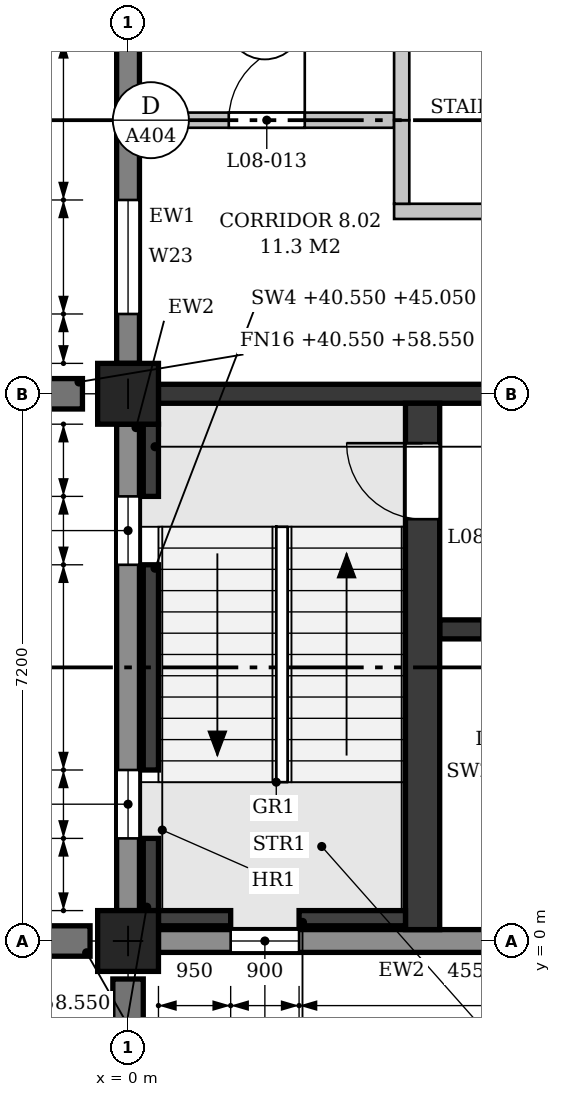
"""IFC4 building model, lengths in metres.
Left out: names, types, materials, properties, quantities, classifications, styles, units other than length and angle.
Written with IfcOpenShell. Run it as: python <this file> out.ifc"""

import sys

from ifc_helpers import new_model, si_unit, direction, frame, frame_2d, origin, origin_2d, place, context, subcontext, project, spatial, polyline, rectangle, outline, extrude, element, fill, save


model = new_model("IFC4")
c1 = context("Model", 3, precision=1e-05, world=origin(), true_north=direction((0.0, 1.0)))
c2 = subcontext(c1, "Body", "Model", "MODEL_VIEW")
j1 = project(units=[si_unit("LENGTHUNIT", "METRE"), si_unit("PLANEANGLEUNIT", "RADIAN")], contexts=[c1])
p1 = place(None, origin())
s1 = spatial("IfcSite", under=j1, at=p1, CompositionType="ELEMENT")
p2 = place(p1, origin())
s2 = spatial("IfcBuilding", under=s1, at=p2, CompositionType="ELEMENT")
p3 = place(p2, frame((0.0, 0.0, 40.8)))
s3 = spatial("IfcBuildingStorey", under=s2, at=p3, CompositionType="ELEMENT", Elevation=40.8)
for number, where, z_axis, x_axis in (
    (1, (0.0, 0.0, 0.0), (0.0, 0.0, 1.0), (1.0, 0.0, 0.0)),
    (2, (0.0, 7.2, 0.0), (0.0, 0.0, 1.0), (1.0, 0.0, 0.0)),
):
    element("IfcColumn", number, at=place(p3, frame(where, z_axis=z_axis, x_axis=x_axis)), inside=s3, PredefinedType="COLUMN", context=c2, shape_type="SweptSolid", body=[
        extrude(rectangle(XDim=0.8, YDim=0.8, at=origin_2d()), origin(), (0.0, 0.0, 1.0), 4.5),
    ])
p4 = place(p3, frame((0.0, 0.4, 0.0), z_axis=(0.0, 0.0, 1.0), x_axis=(0.0, 1.0, 0.0)))
e3 = element("IfcWall", 3, at=p4, inside=s3, PredefinedType="STANDARD", context=c2, shape_type="SweptSolid", body=[
    extrude(rectangle(XDim=6.4, YDim=0.3, at=frame_2d((3.2, 0.0))), origin(), (0.0, 0.0, 1.0), 3.65),
])
p5 = place(p4, frame((0.95, 0.0, 0.9)))
e4 = element("IfcOpeningElement", 4, at=p5, cuts=e3, PredefinedType="OPENING", context=c2, shape_type="SweptSolid", body=[
    extrude(outline(polyline([(0.0, 0.0), (0.9, 0.0), (0.9, 2.25), (0.45, 2.7), (0.0, 2.25), (0.0, 0.0)])), frame((0.0, 0.16, 0.0), z_axis=(0.0, -1.0, 0.0), x_axis=(1.0, 0.0, 0.0)), (0.0, 0.0, 1.0), 0.32),
])
p6 = place(p4, frame((4.55, 0.0, 0.9)))
e5 = element("IfcOpeningElement", 5, at=p6, cuts=e3, PredefinedType="OPENING", context=c2, shape_type="SweptSolid", body=[
    extrude(outline(polyline([(0.0, 0.0), (0.9, 0.0), (0.9, 2.25), (0.45, 2.7), (0.0, 2.25), (0.0, 0.0)])), frame((0.0, 0.16, 0.0), z_axis=(0.0, -1.0, 0.0), x_axis=(1.0, 0.0, 0.0)), (0.0, 0.0, 1.0), 0.32),
])
p7 = place(p3, frame((0.0, 7.6, 0.0), z_axis=(0.0, 0.0, 1.0), x_axis=(0.0, 1.0, 0.0)))
e6 = element("IfcWall", 6, at=p7, inside=s3, PredefinedType="STANDARD", context=c2, shape_type="SweptSolid", body=[
    extrude(rectangle(XDim=6.4, YDim=0.3, at=frame_2d((3.2, 0.0))), origin(), (0.0, 0.0, 1.0), 3.65),
])
p8 = place(p7, frame((0.65, 0.0, 0.9)))
e7 = element("IfcOpeningElement", 7, at=p8, cuts=e6, PredefinedType="OPENING", context=c2, shape_type="SweptSolid", body=[
    extrude(outline(polyline([(0.0, 0.0), (1.5, 0.0), (1.5, 1.95), (0.75, 2.7), (0.0, 1.95), (0.0, 0.0)])), frame((0.0, 0.16, 0.0), z_axis=(0.0, -1.0, 0.0), x_axis=(1.0, 0.0, 0.0)), (0.0, 0.0, 1.0), 0.32),
])
p9 = place(p7, frame((4.25, 0.0, 0.9)))
e8 = element("IfcOpeningElement", 8, at=p9, cuts=e6, PredefinedType="OPENING", context=c2, shape_type="SweptSolid", body=[
    extrude(outline(polyline([(0.0, 0.0), (1.5, 0.0), (1.5, 1.95), (0.75, 2.7), (0.0, 1.95), (0.0, 0.0)])), frame((0.0, 0.16, 0.0), z_axis=(0.0, -1.0, 0.0), x_axis=(1.0, 0.0, 0.0)), (0.0, 0.0, 1.0), 0.32),
])
p10 = place(p3, frame((0.4, 0.0, 0.0), z_axis=(0.0, 0.0, 1.0), x_axis=(1.0, 0.0, 0.0)))
e9 = element("IfcWall", 9, at=p10, inside=s3, PredefinedType="STANDARD", context=c2, shape_type="SweptSolid", body=[
    extrude(rectangle(XDim=6.4, YDim=0.3, at=frame_2d((3.2, 0.0))), origin(), (0.0, 0.0, 1.0), 3.65),
])
p11 = place(p10, frame((0.95, 0.0, 0.9)))
e10 = element("IfcOpeningElement", 10, at=p11, cuts=e9, PredefinedType="OPENING", context=c2, shape_type="SweptSolid", body=[
    extrude(outline(polyline([(0.0, 0.0), (0.9, 0.0), (0.9, 2.25), (0.45, 2.7), (0.0, 2.25), (0.0, 0.0)])), frame((0.0, 0.16, 0.0), z_axis=(0.0, -1.0, 0.0), x_axis=(1.0, 0.0, 0.0)), (0.0, 0.0, 1.0), 0.32),
])
for number, where, z_axis, x_axis in (
    (11, (-0.5, 0.0, -0.25), (0.0, 0.0, 1.0), (-1.0, 0.0, 0.0)),
    (12, (0.0, -0.5, -0.25), (0.0, 0.0, 1.0), (0.0, -1.0, 0.0)),
    (13, (-0.6, 7.2, -0.25), (0.0, 0.0, 1.0), (-1.0, 0.0, 0.0)),
):
    element("IfcWall", number, at=place(p3, frame(where, z_axis=z_axis, x_axis=x_axis)), inside=s3, PredefinedType="POLYGONAL", context=c2, shape_type="SweptSolid", body=[
        extrude(outline(polyline([(0.65, 0.0), (0.65, 17.775), (0.5, 18.0), (0.0, 18.0), (0.0, 0.0), (0.65, 0.0)])), frame((0.0, 0.2, 0.0), z_axis=(0.0, -1.0, 0.0), x_axis=(1.0, 0.0, 0.0)), (0.0, 0.0, 1.0), 0.4),
    ])
p12 = place(p3, frame((0.4, 7.2, 0.0), z_axis=(0.0, 0.0, 1.0), x_axis=(1.0, 0.0, 0.0)))
e14 = element("IfcWall", 14, at=p12, inside=s3, PredefinedType="SHEAR", context=c2, shape_type="SweptSolid", body=[
    extrude(rectangle(XDim=6.4, YDim=0.25, at=frame_2d((3.2, 0.0))), origin(), (0.0, 0.0, 1.0), 3.55),
])
p13 = place(p12, frame((4.85, 0.0, 0.0)))
e15 = element("IfcOpeningElement", 15, at=p13, cuts=e14, PredefinedType="OPENING", context=c2, shape_type="SweptSolid", body=[
    extrude(rectangle(XDim=1.1, YDim=2.1, at=frame_2d((0.55, 1.05))), frame((0.0, 0.135, 0.0), z_axis=(0.0, -1.0, 0.0), x_axis=(1.0, 0.0, 0.0)), (0.0, 0.0, 1.0), 0.27),
])
p14 = place(p3, frame((0.3, 0.4, -0.25), z_axis=(0.0, 0.0, 1.0), x_axis=(0.0, 1.0, 0.0)))
e16 = element("IfcWall", 16, at=p14, inside=s3, PredefinedType="SHEAR", context=c2, shape_type="SweptSolid", body=[
    extrude(rectangle(XDim=0.95, YDim=0.2, at=frame_2d((0.475, 0.0))), origin(), (0.0, 0.0, 1.0), 4.5),
])
p15 = place(p3, frame((0.3, 2.25, -0.25), z_axis=(0.0, 0.0, 1.0), x_axis=(0.0, 1.0, 0.0)))
e17 = element("IfcWall", 17, at=p15, inside=s3, PredefinedType="SHEAR", context=c2, shape_type="SweptSolid", body=[
    extrude(rectangle(XDim=2.7, YDim=0.2, at=frame_2d((1.35, 0.0))), origin(), (0.0, 0.0, 1.0), 4.5),
])
p16 = place(p3, frame((0.3, 5.85, -0.25), z_axis=(0.0, 0.0, 1.0), x_axis=(0.0, 1.0, 0.0)))
e18 = element("IfcWall", 18, at=p16, inside=s3, PredefinedType="SHEAR", context=c2, shape_type="SweptSolid", body=[
    extrude(rectangle(XDim=0.95, YDim=0.2, at=frame_2d((0.475, 0.0))), origin(), (0.0, 0.0, 1.0), 4.5),
])
p17 = place(p3, frame((0.4, 0.3, -0.25), z_axis=(0.0, 0.0, 1.0), x_axis=(1.0, 0.0, 0.0)))
e19 = element("IfcWall", 19, at=p17, inside=s3, PredefinedType="SHEAR", context=c2, shape_type="SweptSolid", body=[
    extrude(rectangle(XDim=0.95, YDim=0.2, at=frame_2d((0.475, 0.0))), origin(), (0.0, 0.0, 1.0), 4.5),
])
p18 = place(p3, frame((2.25, 0.3, -0.25), z_axis=(0.0, 0.0, 1.0), x_axis=(1.0, 0.0, 0.0)))
e20 = element("IfcWall", 20, at=p18, inside=s3, PredefinedType="SHEAR", context=c2, shape_type="SweptSolid", body=[
    extrude(rectangle(XDim=1.4, YDim=0.2, at=frame_2d((0.7, 0.0))), origin(), (0.0, 0.0, 1.0), 4.5),
])
p19 = place(p3, frame((3.875, 0.15, 0.0), z_axis=(0.0, 0.0, 1.0), x_axis=(0.0, 1.0, 0.0)))
e21 = element("IfcWall", 21, at=p19, inside=s3, PredefinedType="SHEAR", context=c2, shape_type="SweptSolid", body=[
    extrude(rectangle(XDim=6.925, YDim=0.45, at=frame_2d((3.462, 0.0))), origin(), (0.0, 0.0, 1.0), 4.25),
])
p20 = place(p19, frame((5.4, 0.0, 0.0)))
e22 = element("IfcOpeningElement", 22, at=p20, cuts=e21, PredefinedType="OPENING", context=c2, shape_type="SweptSolid", body=[
    extrude(rectangle(XDim=1.0, YDim=2.1, at=frame_2d((0.5, 1.05))), frame((0.0, 0.235, 0.0), z_axis=(0.0, -1.0, 0.0), x_axis=(1.0, 0.0, 0.0)), (0.0, 0.0, 1.0), 0.47),
])
p21 = place(p3, frame((4.1, 4.1, 0.0), z_axis=(0.0, 0.0, 1.0), x_axis=(1.0, 0.0, 0.0)))
e23 = element("IfcWall", 23, at=p21, inside=s3, PredefinedType="SHEAR", context=c2, shape_type="SweptSolid", body=[
    extrude(rectangle(XDim=2.975, YDim=0.25, at=frame_2d((1.487, 0.0))), origin(), (0.0, 0.0, 1.0), 4.25),
])
p22 = place(p21, frame((0.55, 0.0, 0.0)))
e24 = element("IfcOpeningElement", 24, at=p22, cuts=e23, PredefinedType="OPENING", context=c2, shape_type="SweptSolid", body=[
    extrude(rectangle(XDim=0.9, YDim=2.1, at=frame_2d((0.45, 1.05))), frame((0.0, 0.135, 0.0), z_axis=(0.0, -1.0, 0.0), x_axis=(1.0, 0.0, 0.0)), (0.0, 0.0, 1.0), 0.27),
])
p23 = place(p3, frame((3.5, 9.6, 0.0), z_axis=(0.0, 0.0, 1.0), x_axis=(1.0, 0.0, 0.0)))
e25 = element("IfcWall", 25, at=p23, inside=s3, PredefinedType="PARTITIONING", context=c2, shape_type="SweptSolid", body=[
    extrude(outline(polyline([(0.0, 0.0), (14.6, 0.0), (14.6, 4.25), (11.125, 4.25), (11.125, 3.55), (10.675, 3.55), (10.675, 4.25), (3.925, 4.25), (3.925, 3.55), (3.475, 3.55), (3.475, 4.25), (0.0, 4.25), (0.0, 0.0)])), frame((0.0, 0.1, 0.0), z_axis=(0.0, -1.0, 0.0), x_axis=(1.0, 0.0, 0.0)), (0.0, 0.0, 1.0), 0.2),
])
p24 = place(p23, frame((5.0, 0.0, 0.0)))
e26 = element("IfcOpeningElement", 26, at=p24, cuts=e25, PredefinedType="OPENING", context=c2, shape_type="SweptSolid", body=[
    extrude(rectangle(XDim=1.0, YDim=2.1, at=frame_2d((0.5, 1.05))), frame((0.0, 0.11, 0.0), z_axis=(0.0, -1.0, 0.0), x_axis=(1.0, 0.0, 0.0)), (0.0, 0.0, 1.0), 0.22),
])
p25 = place(p3, frame((0.15, 10.8, 0.0), z_axis=(0.0, 0.0, 1.0), x_axis=(1.0, 0.0, 0.0)))
e27 = element("IfcWall", 27, at=p25, inside=s3, PredefinedType="PARTITIONING", context=c2, shape_type="SweptSolid", body=[
    extrude(outline(polyline([(0.0, 0.0), (3.35, 0.0), (3.35, 4.25), (0.05, 4.25), (0.05, 3.65), (0.0, 3.65), (0.0, 0.0)])), frame((0.0, 0.1, 0.0), z_axis=(0.0, -1.0, 0.0), x_axis=(1.0, 0.0, 0.0)), (0.0, 0.0, 1.0), 0.2),
])
p26 = place(p25, frame((1.175, 0.0, 0.0)))
e28 = element("IfcOpeningElement", 28, at=p26, cuts=e27, PredefinedType="OPENING", context=c2, shape_type="SweptSolid", body=[
    extrude(rectangle(XDim=1.0, YDim=2.1, at=frame_2d((0.5, 1.05))), frame((0.0, 0.11, 0.0), z_axis=(0.0, -1.0, 0.0), x_axis=(1.0, 0.0, 0.0)), (0.0, 0.0, 1.0), 0.22),
])
p27 = place(p3, frame((3.6, 9.7, 0.0), z_axis=(0.0, 0.0, 1.0), x_axis=(0.0, 1.0, 0.0)))
e29 = element("IfcWall", 29, at=p27, inside=s3, PredefinedType="PARTITIONING", context=c2, shape_type="SweptSolid", body=[
    extrude(rectangle(XDim=1.1, YDim=0.2, at=frame_2d((0.55, 0.0))), origin(), (0.0, 0.0, 1.0), 4.25),
])
p28 = place(p3, frame((3.6, 10.8, 0.0), z_axis=(0.0, 0.0, 1.0), x_axis=(0.0, 1.0, 0.0)))
e30 = element("IfcWall", 30, at=p28, inside=s3, PredefinedType="PARTITIONING", context=c2, shape_type="SweptSolid", body=[
    extrude(outline(polyline([(0.0, 0.0), (10.65, 0.0), (10.6, 4.25), (3.825, 4.25), (3.825, 3.55), (3.375, 3.55), (3.375, 4.25), (0.0, 4.25), (0.0, 0.0)])), frame((0.0, 0.1, 0.0), z_axis=(0.0, -1.0, 0.0), x_axis=(1.0, 0.0, 0.0)), (0.0, 0.0, 1.0), 0.2),
])
p29 = place(p11, origin())
e31 = element("IfcWindow", 31, at=p29, inside=s3, PartitioningType="SINGLE_PANEL", PredefinedType="WINDOW", context=c2, shape_type="SweptSolid", body=[
    extrude(outline(polyline([(0.0, 0.0), (0.9, 0.0), (0.9, 2.25), (0.45, 2.7), (0.0, 2.25), (0.0, 0.0)])), frame((0.0, 0.03, 0.0), z_axis=(0.0, -1.0, 0.0), x_axis=(1.0, 0.0, 0.0)), (0.0, 0.0, 1.0), 0.06),
])
fill(e10, e31)
p30 = place(p5, origin())
e32 = element("IfcWindow", 32, at=p30, inside=s3, PartitioningType="SINGLE_PANEL", PredefinedType="WINDOW", context=c2, shape_type="SweptSolid", body=[
    extrude(outline(polyline([(0.0, 0.0), (0.9, 0.0), (0.9, 2.25), (0.45, 2.7), (0.0, 2.25), (0.0, 0.0)])), frame((0.0, 0.03, 0.0), z_axis=(0.0, -1.0, 0.0), x_axis=(1.0, 0.0, 0.0)), (0.0, 0.0, 1.0), 0.06),
])
fill(e4, e32)
p31 = place(p6, origin())
e33 = element("IfcWindow", 33, at=p31, inside=s3, PartitioningType="SINGLE_PANEL", PredefinedType="WINDOW", context=c2, shape_type="SweptSolid", body=[
    extrude(outline(polyline([(0.0, 0.0), (0.9, 0.0), (0.9, 2.25), (0.45, 2.7), (0.0, 2.25), (0.0, 0.0)])), frame((0.0, 0.03, 0.0), z_axis=(0.0, -1.0, 0.0), x_axis=(1.0, 0.0, 0.0)), (0.0, 0.0, 1.0), 0.06),
])
fill(e5, e33)
p32 = place(p8, origin())
e34 = element("IfcWindow", 34, at=p32, inside=s3, PartitioningType="SINGLE_PANEL", PredefinedType="WINDOW", context=c2, shape_type="SweptSolid", body=[
    extrude(outline(polyline([(0.0, 0.0), (1.5, 0.0), (1.5, 1.95), (0.75, 2.7), (0.0, 1.95), (0.0, 0.0)])), frame((0.0, 0.03, 0.0), z_axis=(0.0, -1.0, 0.0), x_axis=(1.0, 0.0, 0.0)), (0.0, 0.0, 1.0), 0.06),
])
fill(e7, e34)
p33 = place(p20, origin())
e35 = element("IfcDoor", 35, at=p33, inside=s3, OperationType="SINGLE_SWING_RIGHT", PredefinedType="DOOR", context=c2, shape_type="SweptSolid", body=[
    extrude(rectangle(XDim=1.0, YDim=2.1, at=frame_2d((0.5, 1.05))), frame((0.0, 0.025, 0.0), z_axis=(0.0, -1.0, 0.0), x_axis=(1.0, 0.0, 0.0)), (0.0, 0.0, 1.0), 0.05),
])
fill(e22, e35)
p34 = place(p26, origin())
e36 = element("IfcDoor", 36, at=p34, inside=s3, OperationType="SINGLE_SWING_RIGHT", PredefinedType="DOOR", context=c2, shape_type="SweptSolid", body=[
    extrude(rectangle(XDim=1.0, YDim=2.1, at=frame_2d((0.5, 1.05))), frame((0.0, 0.025, 0.0), z_axis=(0.0, -1.0, 0.0), x_axis=(1.0, 0.0, 0.0)), (0.0, 0.0, 1.0), 0.05),
])
fill(e28, e36)
save(model, sys.argv[1])
